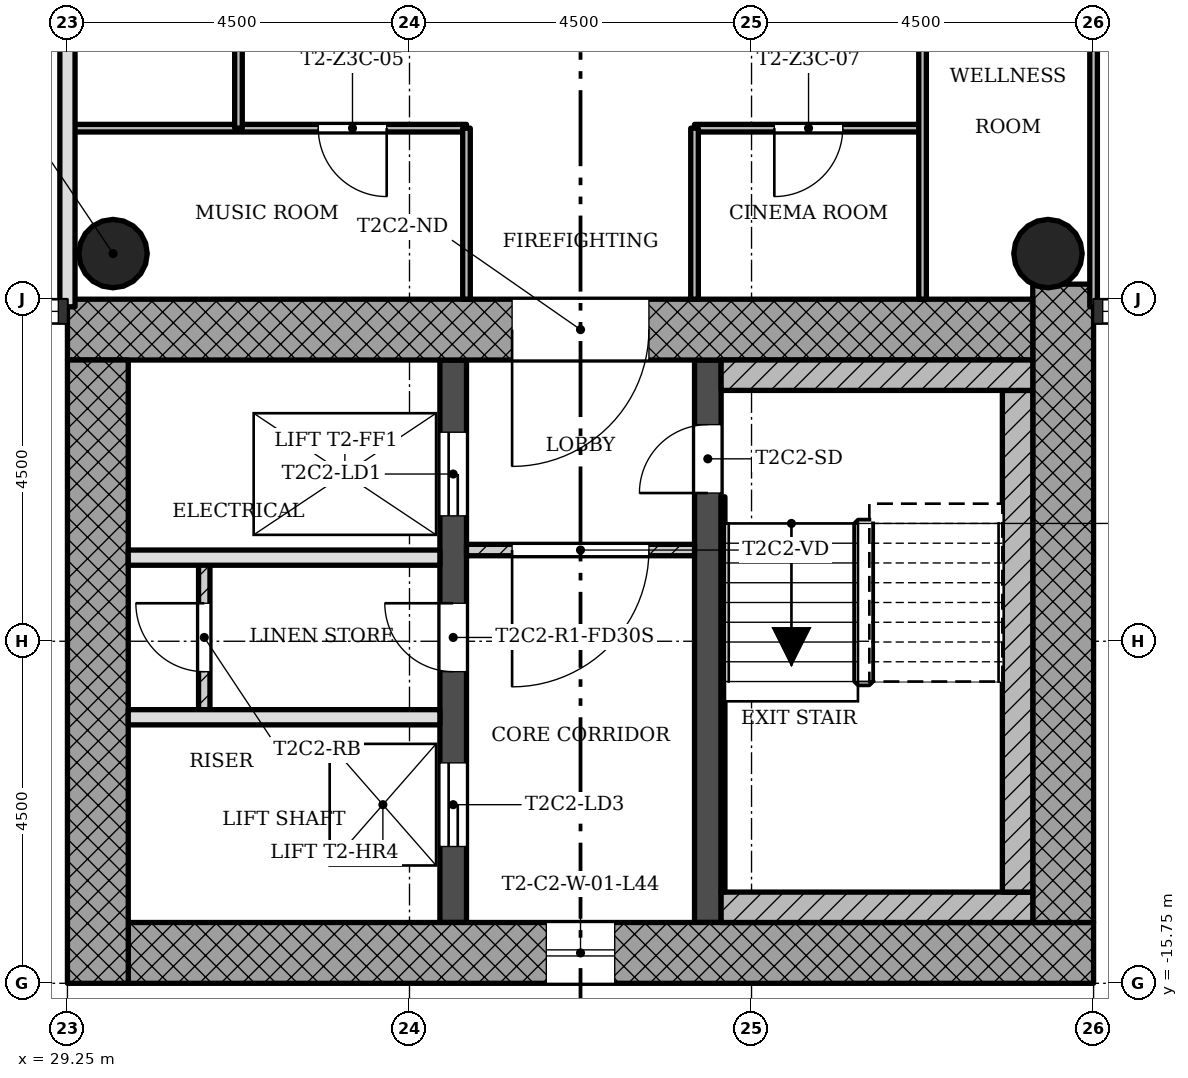
"""IFC4 building model, lengths in metres.
Left out: names, types, materials, properties, quantities, classifications, styles, units other than length and angle.
Written with IfcOpenShell. Run it as: python <this file> out.ifc"""

import sys

from ifc_helpers import new_model, si_unit, direction, frame, frame_2d, origin, origin_2d, place, context, subcontext, project, spatial, rectangle, hollow_circle, extrude, element, fill, save


model = new_model("IFC4")
c1 = context("Model", 3, precision=1e-05, world=origin(), true_north=direction((0.0, 1.0)))
c2 = subcontext(c1, "Body", "Model", "MODEL_VIEW")
j1 = project(units=[si_unit("LENGTHUNIT", "METRE"), si_unit("PLANEANGLEUNIT", "RADIAN")], contexts=[c1])
p1 = place(None, origin())
s1 = spatial("IfcSite", under=j1, at=p1, CompositionType="ELEMENT")
p2 = place(p1, origin())
s2 = spatial("IfcBuilding", under=s1, at=p2, CompositionType="ELEMENT")
p3 = place(p2, frame((0.0, 0.0, 160.9)))
s3 = spatial("IfcBuildingStorey", under=s2, at=p3, CompositionType="ELEMENT", Elevation=160.9)
p4 = place(p3, frame((30.05, -15.35, 0.0), z_axis=(0.0, 0.0, 1.0), x_axis=(1.0, 0.0, 0.0)))
e1 = element("IfcWall", 1, at=p4, inside=s3, PredefinedType="SHEAR", context=c2, shape_type="SweptSolid", body=[
    extrude(rectangle(XDim=12.7, YDim=0.8, at=frame_2d((6.35, 0.0))), origin(), (0.0, 0.0, 1.0), 3.4),
])
p5 = place(p4, frame((5.5, 0.0, 0.45)))
e2 = element("IfcOpeningElement", 2, at=p5, cuts=e1, PredefinedType="OPENING", context=c2, shape_type="SweptSolid", body=[
    extrude(rectangle(XDim=0.9, YDim=2.4, at=frame_2d((0.45, 1.2))), frame((0.0, 0.41, 0.0), z_axis=(0.0, -1.0, 0.0), x_axis=(1.0, 0.0, 0.0)), (0.0, 0.0, 1.0), 0.82),
])
p6 = place(p3, frame((42.35, -14.95, 0.0), z_axis=(0.0, 0.0, 1.0), x_axis=(0.0, 1.0, 0.0)))
e3 = element("IfcWall", 3, at=p6, inside=s3, PredefinedType="SHEAR", context=c2, shape_type="SweptSolid", body=[
    extrude(rectangle(XDim=8.398, YDim=0.8, at=frame_2d((4.199, 0.0))), origin(), (0.0, 0.0, 1.0), 3.4),
])
p7 = place(p3, frame((41.95, -7.15, 0.0), z_axis=(0.0, 0.0, 1.0), x_axis=(-1.0, 0.0, 0.0)))
e4 = element("IfcWall", 4, at=p7, inside=s3, PredefinedType="SHEAR", context=c2, shape_type="SweptSolid", body=[
    extrude(rectangle(XDim=12.7, YDim=0.8, at=frame_2d((6.35, 0.0))), origin(), (0.0, 0.0, 1.0), 3.4),
])
p8 = place(p7, frame((5.05, 0.0, 0.0)))
e5 = element("IfcOpeningElement", 5, at=p8, cuts=e4, PredefinedType="OPENING", context=c2, shape_type="SweptSolid", body=[
    extrude(rectangle(XDim=1.8, YDim=2.1, at=frame_2d((0.9, 1.05))), frame((0.0, 0.41, 0.0), z_axis=(0.0, -1.0, 0.0), x_axis=(1.0, 0.0, 0.0)), (0.0, 0.0, 1.0), 0.82),
])
p9 = place(p3, frame((29.65, -7.55, 0.0), z_axis=(0.0, 0.0, 1.0), x_axis=(0.0, -1.0, 0.0)))
e6 = element("IfcWall", 6, at=p9, inside=s3, PredefinedType="SHEAR", context=c2, shape_type="SweptSolid", body=[
    extrude(rectangle(XDim=8.2, YDim=0.8, at=frame_2d((4.1, 0.0))), origin(), (0.0, 0.0, 1.0), 3.4),
])
p10 = place(p3, frame((34.325, -14.95, 0.0), z_axis=(0.0, 0.0, 1.0), x_axis=(0.0, 1.0, 0.0)))
e7 = element("IfcWall", 7, at=p10, inside=s3, PredefinedType="SHEAR", context=c2, shape_type="SweptSolid", body=[
    extrude(rectangle(XDim=7.4, YDim=0.35, at=frame_2d((3.7, 0.0))), origin(), (0.0, 0.0, 1.0), 3.4),
])
p11 = place(p10, frame((5.35, 0.0, 0.0)))
e8 = element("IfcOpeningElement", 8, at=p11, cuts=e7, PredefinedType="OPENING", context=c2, shape_type="SweptSolid", body=[
    extrude(rectangle(XDim=1.1, YDim=2.1, at=frame_2d((0.55, 1.05))), frame((0.0, 0.185, 0.0), z_axis=(0.0, -1.0, 0.0), x_axis=(1.0, 0.0, 0.0)), (0.0, 0.0, 1.0), 0.37),
])
p12 = place(p10, frame((1.0, 0.0, 0.0)))
e9 = element("IfcOpeningElement", 9, at=p12, cuts=e7, PredefinedType="OPENING", context=c2, shape_type="SweptSolid", body=[
    extrude(rectangle(XDim=1.1, YDim=2.1, at=frame_2d((0.55, 1.05))), frame((0.0, 0.185, 0.0), z_axis=(0.0, -1.0, 0.0), x_axis=(1.0, 0.0, 0.0)), (0.0, 0.0, 1.0), 0.37),
])
p13 = place(p10, frame((3.3, 0.0, 0.0)))
e10 = element("IfcOpeningElement", 10, at=p13, cuts=e7, PredefinedType="OPENING", context=c2, shape_type="SweptSolid", body=[
    extrude(rectangle(XDim=0.9, YDim=2.1, at=frame_2d((0.45, 1.05))), frame((0.0, 0.185, 0.0), z_axis=(0.0, -1.0, 0.0), x_axis=(1.0, 0.0, 0.0)), (0.0, 0.0, 1.0), 0.37),
])
p14 = place(p3, frame((37.675, -14.95, 0.0), z_axis=(0.0, 0.0, 1.0), x_axis=(0.0, 1.0, 0.0)))
e11 = element("IfcWall", 11, at=p14, inside=s3, PredefinedType="SHEAR", context=c2, shape_type="SweptSolid", body=[
    extrude(rectangle(XDim=7.4, YDim=0.35, at=frame_2d((3.7, 0.0))), origin(), (0.0, 0.0, 1.0), 3.4),
])
p15 = place(p14, frame((5.65, 0.0, 0.0)))
e12 = element("IfcOpeningElement", 12, at=p15, cuts=e11, PredefinedType="OPENING", context=c2, shape_type="SweptSolid", body=[
    extrude(rectangle(XDim=0.9, YDim=2.1, at=frame_2d((0.45, 1.05))), frame((0.0, 0.185, 0.0), z_axis=(0.0, -1.0, 0.0), x_axis=(1.0, 0.0, 0.0)), (0.0, 0.0, 1.0), 0.37),
])
for number, where, z_axis, x_axis in (
    (13, (42.15, -6.15, 0.0), (0.0, 0.0, 1.0), (1.0, 0.0, 0.0)),
    (14, (29.85, -6.15, 0.0), (0.0, 0.0, 1.0), (1.0, 0.0, 0.0)),
):
    element("IfcColumn", number, at=place(p3, frame(where, z_axis=z_axis, x_axis=x_axis)), inside=s3, PredefinedType="COLUMN", context=c2, shape_type="SweptSolid", body=[
        extrude(hollow_circle(Radius=0.45, WallThickness=0.032, at=origin_2d()), origin(), (0.0, 0.0, 1.0), 3.4),
    ])
p16 = place(p3, frame((34.5, -10.05, 0.0), z_axis=(0.0, 0.0, 1.0), x_axis=(1.0, 0.0, 0.0)))
e15 = element("IfcWall", 15, at=p16, inside=s3, PredefinedType="PARTITIONING", context=c2, shape_type="SweptSolid", body=[
    extrude(rectangle(XDim=3.0, YDim=0.15, at=frame_2d((1.5, 0.0))), origin(), (0.0, 0.0, 1.0), 3.0),
])
p17 = place(p16, frame((0.6, 0.0, 0.0)))
e16 = element("IfcOpeningElement", 16, at=p17, cuts=e15, PredefinedType="OPENING", context=c2, shape_type="SweptSolid", body=[
    extrude(rectangle(XDim=1.8, YDim=2.1, at=frame_2d((0.9, 1.05))), frame((0.0, 0.085, 0.0), z_axis=(0.0, -1.0, 0.0), x_axis=(1.0, 0.0, 0.0)), (0.0, 0.0, 1.0), 0.17),
])
for number, where, z_axis, x_axis in (
    (17, (30.05, -12.25, 0.0), (0.0, 0.0, 1.0), (1.0, 0.0, 0.0)),
    (18, (30.05, -10.15, 0.0), (0.0, 0.0, 1.0), (1.0, 0.0, 0.0)),
):
    element("IfcWall", number, at=place(p3, frame(where, z_axis=z_axis, x_axis=x_axis)), inside=s3, PredefinedType="SOLIDWALL", context=c2, shape_type="SweptSolid", body=[
        extrude(rectangle(XDim=4.1, YDim=0.2, at=frame_2d((2.05, 0.0))), origin(), (0.0, 0.0, 1.0), 3.0),
    ])
p18 = place(p3, frame((31.05, -10.15, 0.0), z_axis=(0.0, 0.0, 1.0), x_axis=(0.0, -1.0, 0.0)))
e19 = element("IfcWall", 19, at=p18, inside=s3, PredefinedType="PARTITIONING", context=c2, shape_type="SweptSolid", body=[
    extrude(rectangle(XDim=2.1, YDim=0.15, at=frame_2d((1.05, 0.0))), origin(), (0.0, 0.0, 1.0), 3.0),
])
p19 = place(p18, frame((0.6, 0.0, 0.0)))
e20 = element("IfcOpeningElement", 20, at=p19, cuts=e19, PredefinedType="OPENING", context=c2, shape_type="SweptSolid", body=[
    extrude(rectangle(XDim=0.9, YDim=2.1, at=frame_2d((0.45, 1.05))), frame((0.0, 0.085, 0.0), z_axis=(0.0, -1.0, 0.0), x_axis=(1.0, 0.0, 0.0)), (0.0, 0.0, 1.0), 0.17),
])
p20 = place(p3, frame((40.5, -4.5, 0.0), z_axis=(0.0, 0.0, 1.0), x_axis=(-1.0, 0.0, 0.0)))
e21 = element("IfcWall", 21, at=p20, inside=s3, PredefinedType="PARTITIONING", context=c2, shape_type="SweptSolid", body=[
    extrude(rectangle(XDim=3.0, YDim=0.1, at=frame_2d((1.5, 0.0))), origin(), (0.0, 0.0, 1.0), 3.0),
])
p21 = place(p20, frame((1.05, 0.0, 0.0)))
e22 = element("IfcOpeningElement", 22, at=p21, cuts=e21, PredefinedType="OPENING", context=c2, shape_type="SweptSolid", body=[
    extrude(rectangle(XDim=0.9, YDim=2.1, at=frame_2d((0.45, 1.05))), frame((0.0, 0.06, 0.0), z_axis=(0.0, -1.0, 0.0), x_axis=(1.0, 0.0, 0.0)), (0.0, 0.0, 1.0), 0.12),
])
p22 = place(p3, frame((34.5, -4.5, 0.0), z_axis=(0.0, 0.0, 1.0), x_axis=(-1.0, 0.0, 0.0)))
e23 = element("IfcWall", 23, at=p22, inside=s3, PredefinedType="PARTITIONING", context=c2, shape_type="SweptSolid", body=[
    extrude(rectangle(XDim=5.25, YDim=0.1, at=frame_2d((2.625, 0.0))), origin(), (0.0, 0.0, 1.0), 3.0),
])
p23 = place(p22, frame((1.05, 0.0, 0.0)))
e24 = element("IfcOpeningElement", 24, at=p23, cuts=e23, PredefinedType="OPENING", context=c2, shape_type="SweptSolid", body=[
    extrude(rectangle(XDim=0.9, YDim=2.1, at=frame_2d((0.45, 1.05))), frame((0.0, 0.06, 0.0), z_axis=(0.0, -1.0, 0.0), x_axis=(1.0, 0.0, 0.0)), (0.0, 0.0, 1.0), 0.12),
])
p24 = place(p3, frame((42.75, -6.85, 0.0), z_axis=(0.0, 0.0, 1.0), x_axis=(0.0, 1.0, 0.0)))
e25 = element("IfcWall", 25, at=p24, inside=s3, PredefinedType="PARTITIONING", context=c2, shape_type="SweptSolid", body=[
    extrude(rectangle(XDim=5.95, YDim=0.1, at=frame_2d((2.975, 0.0))), origin(), (0.0, 0.0, 1.0), 3.0),
])
p25 = place(p3, frame((40.5, -6.75, 0.0), z_axis=(0.0, 0.0, 1.0), x_axis=(0.0, 1.0, 0.0)))
e26 = element("IfcWall", 26, at=p25, inside=s3, PredefinedType="PARTITIONING", context=c2, shape_type="SweptSolid", body=[
    extrude(rectangle(XDim=5.85, YDim=0.1, at=frame_2d((2.925, 0.0))), origin(), (0.0, 0.0, 1.0), 3.0),
])
p26 = place(p25, frame((3.6, 0.0, 0.0)))
e27 = element("IfcOpeningElement", 27, at=p26, cuts=e26, PredefinedType="OPENING", context=c2, shape_type="SweptSolid", body=[
    extrude(rectangle(XDim=0.9, YDim=2.1, at=frame_2d((0.45, 1.05))), frame((0.0, 0.06, 0.0), z_axis=(0.0, -1.0, 0.0), x_axis=(1.0, 0.0, 0.0)), (0.0, 0.0, 1.0), 0.12),
])
for number, where, z_axis, x_axis in (
    (28, (37.5, -6.75, 0.0), (0.0, 0.0, 1.0), (0.0, 1.0, 0.0)),
    (29, (34.5, -6.75, 0.0), (0.0, 0.0, 1.0), (0.0, 1.0, 0.0)),
):
    element("IfcWall", number, at=place(p3, frame(where, z_axis=z_axis, x_axis=x_axis)), inside=s3, PredefinedType="PARTITIONING", context=c2, shape_type="SweptSolid", body=[
        extrude(rectangle(XDim=2.25, YDim=0.1, at=frame_2d((1.125, 0.0))), origin(), (0.0, 0.0, 1.0), 3.0),
    ])
p27 = place(p3, frame((31.5, -4.5, 0.0), z_axis=(0.0, 0.0, 1.0), x_axis=(0.0, 1.0, 0.0)))
e30 = element("IfcWall", 30, at=p27, inside=s3, PredefinedType="PARTITIONING", context=c2, shape_type="SweptSolid", body=[
    extrude(rectangle(XDim=3.6, YDim=0.1, at=frame_2d((1.8, 0.0))), origin(), (0.0, 0.0, 1.0), 3.0),
])
p28 = place(p27, frame((1.35, 0.0, 0.0)))
e31 = element("IfcOpeningElement", 31, at=p28, cuts=e30, PredefinedType="OPENING", context=c2, shape_type="SweptSolid", body=[
    extrude(rectangle(XDim=0.9, YDim=2.1, at=frame_2d((0.45, 1.05))), frame((0.0, 0.06, 0.0), z_axis=(0.0, -1.0, 0.0), x_axis=(1.0, 0.0, 0.0)), (0.0, 0.0, 1.0), 0.12),
])
p29 = place(p3, frame((29.25, -6.85, 0.0), z_axis=(0.0, 0.0, 1.0), x_axis=(0.0, 1.0, 0.0)))
e32 = element("IfcWall", 32, at=p29, inside=s3, PredefinedType="SOLIDWALL", context=c2, shape_type="SweptSolid", body=[
    extrude(rectangle(XDim=13.7, YDim=0.2, at=frame_2d((6.85, 0.0))), origin(), (0.0, 0.0, 1.0), 3.0),
])
p30 = place(p29, frame((6.4, 0.0, 0.0)))
e33 = element("IfcOpeningElement", 33, at=p30, cuts=e32, PredefinedType="OPENING", context=c2, shape_type="SweptSolid", body=[
    extrude(rectangle(XDim=0.9, YDim=2.1, at=frame_2d((0.45, 1.05))), frame((0.0, 0.11, 0.0), z_axis=(0.0, -1.0, 0.0), x_axis=(1.0, 0.0, 0.0)), (0.0, 0.0, 1.0), 0.22),
])
p31 = place(p3, frame((37.85, -14.75, 0.0), z_axis=(0.0, 0.0, 1.0), x_axis=(1.0, 0.0, 0.0)))
e34 = element("IfcWall", 34, at=p31, inside=s3, PredefinedType="SHEAR", context=c2, shape_type="SweptSolid", body=[
    extrude(rectangle(XDim=4.1, YDim=0.4, at=frame_2d((2.05, 0.0))), origin(), (0.0, 0.0, 1.0), 3.4),
])
p32 = place(p3, frame((41.75, -7.95, 0.0), z_axis=(0.0, 0.0, 1.0), x_axis=(0.0, -1.0, 0.0)))
e35 = element("IfcWall", 35, at=p32, inside=s3, PredefinedType="SHEAR", context=c2, shape_type="SweptSolid", body=[
    extrude(rectangle(XDim=6.6, YDim=0.4, at=frame_2d((3.3, 0.0))), origin(), (0.0, 0.0, 1.0), 3.4),
])
p33 = place(p3, frame((37.85, -7.75, 0.0), z_axis=(0.0, 0.0, 1.0), x_axis=(1.0, 0.0, 0.0)))
e36 = element("IfcWall", 36, at=p33, inside=s3, PredefinedType="SHEAR", context=c2, shape_type="SweptSolid", body=[
    extrude(rectangle(XDim=4.1, YDim=0.4, at=frame_2d((2.05, 0.0))), origin(), (0.0, 0.0, 1.0), 3.4),
])
p34 = place(p3, frame((37.875, -9.35, 0.0), z_axis=(0.0, 0.0, 1.0), x_axis=(0.0, -1.0, 0.0)))
e37 = element("IfcWall", 37, at=p34, inside=s3, PredefinedType="SHEAR", context=c2, shape_type="SweptSolid", body=[
    extrude(rectangle(XDim=5.2, YDim=0.05, at=frame_2d((2.6, 0.0))), origin(), (0.0, 0.0, 1.0), 3.4),
])
p35 = place(p5, origin())
e38 = element("IfcWindow", 38, at=p35, inside=s3, PartitioningType="SINGLE_PANEL", PredefinedType="WINDOW", context=c2, shape_type="SweptSolid", body=[
    extrude(rectangle(XDim=0.9, YDim=2.4, at=frame_2d((0.45, 1.2))), frame((0.0, 0.03, 0.0), z_axis=(0.0, -1.0, 0.0), x_axis=(1.0, 0.0, 0.0)), (0.0, 0.0, 1.0), 0.06),
])
fill(e2, e38)
p36 = place(p17, origin())
e39 = element("IfcDoor", 39, at=p36, inside=s3, OperationType="SINGLE_SWING_LEFT", PredefinedType="DOOR", context=c2, shape_type="SweptSolid", body=[
    extrude(rectangle(XDim=1.8, YDim=2.1, at=frame_2d((0.9, 1.05))), frame((0.0, 0.025, 0.0), z_axis=(0.0, -1.0, 0.0), x_axis=(1.0, 0.0, 0.0)), (0.0, 0.0, 1.0), 0.05),
])
fill(e16, e39)
p37 = place(p19, origin())
e40 = element("IfcDoor", 40, at=p37, inside=s3, OperationType="SINGLE_SWING_LEFT", PredefinedType="DOOR", context=c2, shape_type="SweptSolid", body=[
    extrude(rectangle(XDim=0.9, YDim=2.1, at=frame_2d((0.45, 1.05))), frame((0.0, 0.025, 0.0), z_axis=(0.0, -1.0, 0.0), x_axis=(1.0, 0.0, 0.0)), (0.0, 0.0, 1.0), 0.05),
])
fill(e20, e40)
p38 = place(p23, origin())
e41 = element("IfcDoor", 41, at=p38, inside=s3, OperationType="SINGLE_SWING_RIGHT", PredefinedType="DOOR", context=c2, shape_type="SweptSolid", body=[
    extrude(rectangle(XDim=0.9, YDim=2.1, at=frame_2d((0.45, 1.05))), frame((0.0, 0.025, 0.0), z_axis=(0.0, -1.0, 0.0), x_axis=(1.0, 0.0, 0.0)), (0.0, 0.0, 1.0), 0.05),
])
fill(e24, e41)
p39 = place(p21, origin())
e42 = element("IfcDoor", 42, at=p39, inside=s3, OperationType="SINGLE_SWING_LEFT", PredefinedType="DOOR", context=c2, shape_type="SweptSolid", body=[
    extrude(rectangle(XDim=0.9, YDim=2.1, at=frame_2d((0.45, 1.05))), frame((0.0, 0.025, 0.0), z_axis=(0.0, -1.0, 0.0), x_axis=(1.0, 0.0, 0.0)), (0.0, 0.0, 1.0), 0.05),
])
fill(e22, e42)
p40 = place(p15, origin())
e43 = element("IfcDoor", 43, at=p40, inside=s3, OperationType="SINGLE_SWING_RIGHT", PredefinedType="DOOR", context=c2, shape_type="SweptSolid", body=[
    extrude(rectangle(XDim=0.9, YDim=2.1, at=frame_2d((0.45, 1.05))), frame((0.0, 0.025, 0.0), z_axis=(0.0, -1.0, 0.0), x_axis=(1.0, 0.0, 0.0)), (0.0, 0.0, 1.0), 0.05),
])
fill(e12, e43)
p41 = place(p11, origin())
e44 = element("IfcDoor", 44, at=p41, inside=s3, OperationType="SLIDING_TO_LEFT", PredefinedType="DOOR", context=c2, shape_type="SweptSolid", body=[
    extrude(rectangle(XDim=1.1, YDim=2.1, at=frame_2d((0.55, 1.05))), frame((0.0, 0.025, 0.0), z_axis=(0.0, -1.0, 0.0), x_axis=(1.0, 0.0, 0.0)), (0.0, 0.0, 1.0), 0.05),
])
fill(e8, e44)
p42 = place(p12, origin())
e45 = element("IfcDoor", 45, at=p42, inside=s3, OperationType="SLIDING_TO_LEFT", PredefinedType="DOOR", context=c2, shape_type="SweptSolid", body=[
    extrude(rectangle(XDim=1.1, YDim=2.1, at=frame_2d((0.55, 1.05))), frame((0.0, 0.025, 0.0), z_axis=(0.0, -1.0, 0.0), x_axis=(1.0, 0.0, 0.0)), (0.0, 0.0, 1.0), 0.05),
])
fill(e9, e45)
p43 = place(p13, origin())
e46 = element("IfcDoor", 46, at=p43, inside=s3, OperationType="SINGLE_SWING_LEFT", PredefinedType="DOOR", context=c2, shape_type="SweptSolid", body=[
    extrude(rectangle(XDim=0.9, YDim=2.1, at=frame_2d((0.45, 1.05))), frame((0.0, 0.025, 0.0), z_axis=(0.0, -1.0, 0.0), x_axis=(1.0, 0.0, 0.0)), (0.0, 0.0, 1.0), 0.05),
])
fill(e10, e46)
p44 = place(p8, origin())
e47 = element("IfcDoor", 47, at=p44, inside=s3, OperationType="SINGLE_SWING_LEFT", PredefinedType="DOOR", context=c2, shape_type="SweptSolid", body=[
    extrude(rectangle(XDim=1.8, YDim=2.1, at=frame_2d((0.9, 1.05))), frame((0.0, 0.025, 0.0), z_axis=(0.0, -1.0, 0.0), x_axis=(1.0, 0.0, 0.0)), (0.0, 0.0, 1.0), 0.05),
])
fill(e5, e47)
save(model, sys.argv[1])
